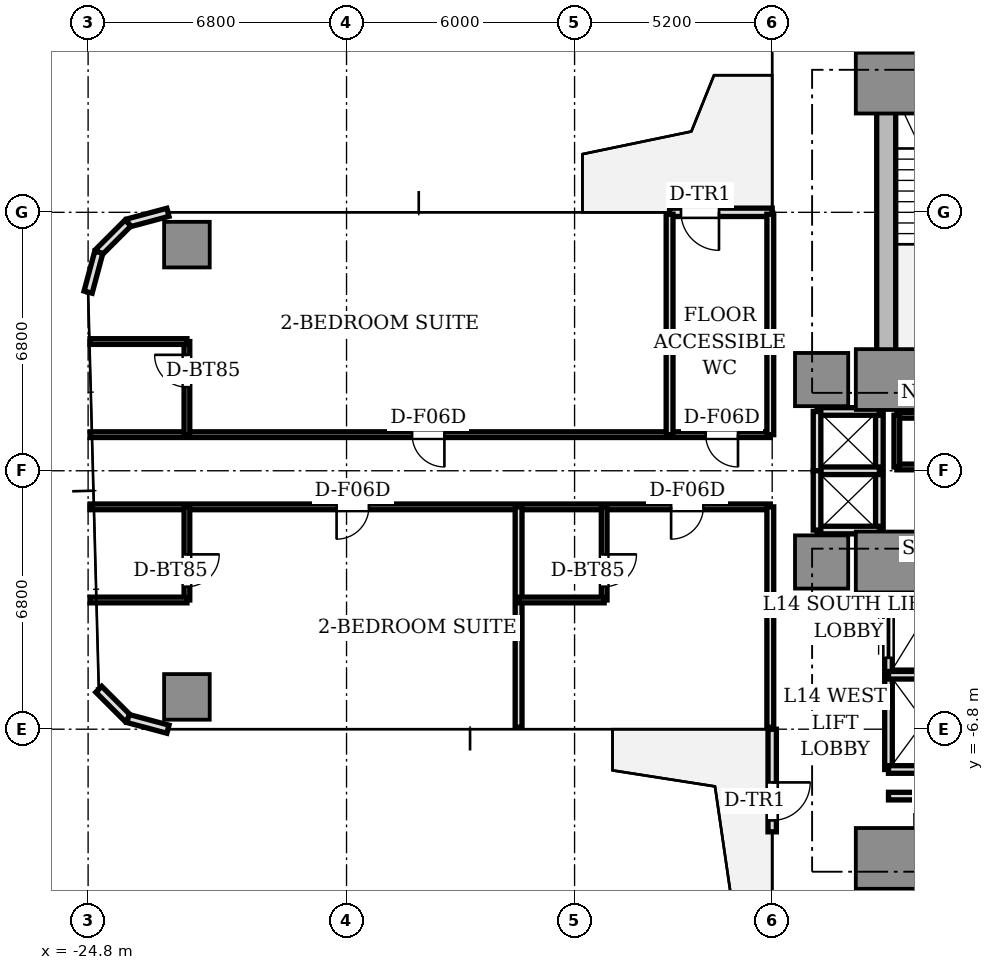
"""IFC4 building model, lengths in metres.
Left out: names, types, materials, properties, quantities, classifications, styles, units other than length and angle.
Written with IfcOpenShell. Run it as: python <this file> out.ifc"""

import sys

from ifc_helpers import new_model, si_unit, direction, frame, frame_2d, origin, origin_2d, place, context, subcontext, project, spatial, rectangle, extrude, source, transform, mapped, element, fill, save


model = new_model("IFC4")
c1 = context("Model", 3, precision=1e-05, world=origin(), true_north=direction((0.0, 1.0)))
c2 = subcontext(c1, "Body", "Model", "MODEL_VIEW")
j1 = project(units=[si_unit("LENGTHUNIT", "METRE"), si_unit("PLANEANGLEUNIT", "RADIAN")], contexts=[c1])
p1 = place(None, origin())
s1 = spatial("IfcSite", under=j1, at=p1, CompositionType="ELEMENT")
p2 = place(p1, origin())
s2 = spatial("IfcBuilding", under=s1, at=p2, CompositionType="ELEMENT")
p3 = place(p2, frame((0.0, 0.0, 54.4)))
s3 = spatial("IfcBuildingStorey", under=s2, at=p3, CompositionType="ELEMENT", Elevation=54.4)
p4 = place(p3, frame((-3.55, 10.2, 0.0), z_axis=(0.0, 0.0, 1.0), x_axis=(1.0, 0.0, 0.0)))
e1 = element("IfcWall", 1, at=p4, inside=s3, PredefinedType="SHEAR", context=c2, shape_type="SweptSolid", body=[
    extrude(rectangle(XDim=7.1, YDim=0.5, at=frame_2d((3.55, 0.0))), origin(), (0.0, 0.0, 1.0), 3.11),
])
p5 = place(p3, frame((-3.8, 2.85, 0.0), z_axis=(0.0, 0.0, 1.0), x_axis=(0.0, 1.0, 0.0)))
e2 = element("IfcWall", 2, at=p5, inside=s3, PredefinedType="SHEAR", context=c2, shape_type="SweptSolid", body=[
    extrude(rectangle(XDim=6.9, YDim=0.5, at=frame_2d((3.45, 0.0))), origin(), (0.0, 0.0, 1.0), 3.11),
])
p6 = place(p3, frame((-3.55, -10.2, 0.0), z_axis=(0.0, 0.0, 1.0), x_axis=(1.0, 0.0, 0.0)))
e3 = element("IfcWall", 3, at=p6, inside=s3, PredefinedType="SHEAR", context=c2, shape_type="SweptSolid", body=[
    extrude(rectangle(XDim=7.1, YDim=0.5, at=frame_2d((3.55, 0.0))), origin(), (0.0, 0.0, 1.0), 3.11),
])
m1 = source(origin(), c2, "Body", "SweptSolid", [
    extrude(rectangle(XDim=1.6, YDim=1.6, at=origin_2d()), origin(), (0.0, 0.0, 1.0), 3.11),
])
for number, where, z_axis, x_axis in (
    (4, (-3.8, 2.4, 0.0), (0.0, 0.0, 1.0), (1.0, 0.0, 0.0)),
    (5, (-3.8, 10.2, 0.0), (0.0, 0.0, 1.0), (1.0, 0.0, 0.0)),
    (6, (-3.8, -2.4, 0.0), (0.0, 0.0, 1.0), (1.0, 0.0, 0.0)),
    (7, (-3.8, -10.2, 0.0), (0.0, 0.0, 1.0), (1.0, 0.0, 0.0)),
):
    element("IfcColumn", number, at=place(p3, frame(where, z_axis=z_axis, x_axis=x_axis)), inside=s3, PredefinedType="COLUMN", context=c2, shape_type="MappedRepresentation", body=[
        mapped(m1, transform((0.0, 0.0, 0.0), scale=1.0)),
    ])
m2 = source(origin(), c2, "Body", "SweptSolid", [
    extrude(rectangle(XDim=1.4, YDim=1.4, at=origin_2d()), origin(), (0.0, 0.0, 1.0), 3.11),
])
for number, where, z_axis, x_axis in (
    (8, (-5.5, 2.4, 0.0), (0.0, 0.0, 1.0), (1.0, 0.0, 0.0)),
    (9, (-5.5, -2.4, 0.0), (0.0, 0.0, 1.0), (1.0, 0.0, 0.0)),
):
    element("IfcColumn", number, at=place(p3, frame(where, z_axis=z_axis, x_axis=x_axis)), inside=s3, PredefinedType="COLUMN", context=c2, shape_type="MappedRepresentation", body=[
        mapped(m2, transform((0.0, 0.0, 0.0), scale=1.0)),
    ])
m3 = source(origin(), c2, "Body", "SweptSolid", [
    extrude(rectangle(XDim=1.2, YDim=1.2, at=origin_2d()), origin(), (0.0, 0.0, 1.0), 3.11),
])
for number, where, z_axis, x_axis in (
    (10, (-22.2, 5.95, 0.0), (0.0, 0.0, 1.0), (1.0, 0.0, 0.0)),
    (11, (-22.2, -5.95, 0.0), (0.0, 0.0, 1.0), (1.0, 0.0, 0.0)),
):
    element("IfcColumn", number, at=place(p3, frame(where, z_axis=z_axis, x_axis=x_axis)), inside=s3, PredefinedType="COLUMN", context=c2, shape_type="MappedRepresentation", body=[
        mapped(m3, transform((0.0, 0.0, 0.0), scale=1.0)),
    ])
p7 = place(p3, frame((-6.8, 6.8, 0.0), z_axis=(0.0, 0.0, 1.0), x_axis=(-1.0, 0.0, 0.0)))
e12 = element("IfcWall", 12, at=p7, inside=s3, PredefinedType="STANDARD", context=c2, shape_type="SweptSolid", body=[
    extrude(rectangle(XDim=2.7, YDim=0.22, at=frame_2d((1.35, 0.0))), origin(), (0.0, 0.0, 1.0), 3.11),
])
p8 = place(p7, frame((1.4, 0.0, 0.0)))
e13 = element("IfcOpeningElement", 13, at=p8, cuts=e12, PredefinedType="OPENING", context=c2, shape_type="SweptSolid", body=[
    extrude(rectangle(XDim=1.0, YDim=2.2, at=frame_2d((0.5, 1.1))), frame((0.0, 0.12, 0.0), z_axis=(0.0, -1.0, 0.0), x_axis=(1.0, 0.0, 0.0)), (0.0, 0.0, 1.0), 0.24),
])
for number, where, z_axis, x_axis in (
    (14, (-22.7, 6.8, 0.0), (0.0, 0.0, 1.0), (-0.966, -0.259, 0.0)),
    (15, (-23.75, 6.519, 0.0), (0.0, 0.0, 1.0), (-0.707, -0.707, 0.0)),
    (16, (-24.519, 5.75, 0.0), (0.0, 0.0, 1.0), (-0.259, -0.966, 0.0)),
    (17, (-24.519, -5.75, 0.0), (0.0, 0.0, 1.0), (0.707, -0.707, 0.0)),
    (18, (-23.75, -6.519, 0.0), (0.0, 0.0, 1.0), (0.966, -0.259, 0.0)),
):
    element("IfcWall", number, at=place(p3, frame(where, z_axis=z_axis, x_axis=x_axis)), inside=s3, PredefinedType="STANDARD", context=c2, shape_type="SweptSolid", body=[
        extrude(rectangle(XDim=1.087, YDim=0.22, at=frame_2d((0.543, 0.0))), origin(), (0.0, 0.0, 1.0), 3.11),
    ])
p9 = place(p3, frame((-6.8, -6.8, 0.0), z_axis=(0.0, 0.0, 1.0), x_axis=(0.0, -1.0, 0.0)))
e19 = element("IfcWall", 19, at=p9, inside=s3, PredefinedType="STANDARD", context=c2, shape_type="SweptSolid", body=[
    extrude(rectangle(XDim=2.7, YDim=0.22, at=frame_2d((1.35, 0.0))), origin(), (0.0, 0.0, 1.0), 3.11),
])
p10 = place(p9, frame((1.4, 0.0, 0.0)))
e20 = element("IfcOpeningElement", 20, at=p10, cuts=e19, PredefinedType="OPENING", context=c2, shape_type="SweptSolid", body=[
    extrude(rectangle(XDim=1.0, YDim=2.2, at=frame_2d((0.5, 1.1))), frame((0.0, 0.12, 0.0), z_axis=(0.0, -1.0, 0.0), x_axis=(1.0, 0.0, 0.0)), (0.0, 0.0, 1.0), 0.24),
])
p11 = place(p3, frame((-3.72, 2.5, 0.0), z_axis=(0.0, 0.0, 1.0), x_axis=(1.0, 0.0, 0.0)))
e21 = element("IfcWall", 21, at=p11, inside=s3, PredefinedType="SOLIDWALL", context=c2, shape_type="SweptSolid", body=[
    extrude(rectangle(XDim=3.72, YDim=0.2, at=frame_2d((1.86, 0.0))), origin(), (0.0, 0.0, 1.0), 3.11),
])
p12 = place(p3, frame((-3.74, -5.36, 0.0), z_axis=(0.0, 0.0, 1.0), x_axis=(0.0, 1.0, 0.0)))
e22 = element("IfcWall", 22, at=p12, inside=s3, PredefinedType="SOLIDWALL", context=c2, shape_type="SweptSolid", body=[
    extrude(rectangle(XDim=2.08, YDim=0.2, at=frame_2d((1.04, 0.0))), origin(), (0.0, 0.0, 1.0), 2.66),
])
p13 = place(p12, frame((0.44, 0.0, 0.0)))
e23 = element("IfcOpeningElement", 23, at=p13, cuts=e22, PredefinedType="OPENING", context=c2, shape_type="SweptSolid", body=[
    extrude(rectangle(XDim=1.2, YDim=2.2, at=frame_2d((0.6, 1.1))), frame((0.0, 0.11, 0.0), z_axis=(0.0, -1.0, 0.0), x_axis=(1.0, 0.0, 0.0)), (0.0, 0.0, 1.0), 0.22),
])
p14 = place(p3, frame((-3.74, -7.86, 0.0), z_axis=(0.0, 0.0, 1.0), x_axis=(0.0, 1.0, 0.0)))
e24 = element("IfcWall", 24, at=p14, inside=s3, PredefinedType="SOLIDWALL", context=c2, shape_type="SweptSolid", body=[
    extrude(rectangle(XDim=2.48, YDim=0.2, at=frame_2d((1.24, 0.0))), origin(), (0.0, 0.0, 1.0), 2.66),
])
p15 = place(p3, frame((-3.74, -7.86, 0.0), z_axis=(0.0, 0.0, 1.0), x_axis=(1.0, 0.0, 0.0)))
e25 = element("IfcWall", 25, at=p15, inside=s3, PredefinedType="SOLIDWALL", context=c2, shape_type="SweptSolid", body=[
    extrude(rectangle(XDim=1.84, YDim=0.2, at=frame_2d((0.92, 0.0))), origin(), (0.0, 0.0, 1.0), 2.66),
])
p16 = place(p3, frame((-3.74, -5.38, 0.0), z_axis=(0.0, 0.0, 1.0), x_axis=(1.0, 0.0, 0.0)))
e26 = element("IfcWall", 26, at=p16, inside=s3, PredefinedType="SOLIDWALL", context=c2, shape_type="SweptSolid", body=[
    extrude(rectangle(XDim=3.69, YDim=0.2, at=frame_2d((1.845, 0.0))), origin(), (0.0, 0.0, 1.0), 2.66),
])
p17 = place(p3, frame((-3.98, -1.56, 0.0), z_axis=(0.0, 0.0, 1.0), x_axis=(0.0, 1.0, 0.0)))
e27 = element("IfcWall", 27, at=p17, inside=s3, PredefinedType="SOLIDWALL", context=c2, shape_type="SweptSolid", body=[
    extrude(rectangle(XDim=3.12, YDim=0.2, at=frame_2d((1.56, 0.0))), origin(), (0.0, 0.0, 1.0), 2.18),
])
for number, where, z_axis, x_axis in (
    (28, (-5.62, 1.56, 0.0), (0.0, 0.0, 1.0), (1.0, 0.0, 0.0)),
    (29, (-5.62, -1.56, 0.0), (0.0, 0.0, 1.0), (1.0, 0.0, 0.0)),
    (30, (-5.62, 0.0, 0.0), (0.0, 0.0, 1.0), (1.0, 0.0, 0.0)),
):
    element("IfcWall", number, at=place(p3, frame(where, z_axis=z_axis, x_axis=x_axis)), inside=s3, PredefinedType="SOLIDWALL", context=c2, shape_type="SweptSolid", body=[
        extrude(rectangle(XDim=1.64, YDim=0.2, at=frame_2d((0.82, 0.0))), origin(), (0.0, 0.0, 1.0), 2.66),
    ])
for number, where, z_axis, x_axis in (
    (31, (-5.62, 0.0, 0.0), (0.0, 0.0, 1.0), (0.0, 1.0, 0.0)),
    (32, (-5.62, -1.56, 0.0), (0.0, 0.0, 1.0), (0.0, 1.0, 0.0)),
):
    element("IfcWall", number, at=place(p3, frame(where, z_axis=z_axis, x_axis=x_axis)), inside=s3, PredefinedType="SOLIDWALL", context=c2, shape_type="SweptSolid", body=[
        extrude(rectangle(XDim=1.56, YDim=0.2, at=frame_2d((0.78, 0.0))), origin(), (0.0, 0.0, 1.0), 2.66),
    ])
p18 = place(p3, frame((-3.74, -8.56, 0.0), z_axis=(0.0, 0.0, 1.0), x_axis=(1.0, 0.0, 0.0)))
e33 = element("IfcWall", 33, at=p18, inside=s3, PredefinedType="SOLIDWALL", context=c2, shape_type="SweptSolid", body=[
    extrude(rectangle(XDim=3.62, YDim=0.2, at=frame_2d((1.81, 0.0))), origin(), (0.0, 0.0, 1.0), 2.66),
])
p19 = place(p18, frame((1.15, 0.0, 0.0)))
e34 = element("IfcOpeningElement", 34, at=p19, cuts=e33, PredefinedType="OPENING", context=c2, shape_type="SweptSolid", body=[
    extrude(rectangle(XDim=0.85, YDim=2.1, at=frame_2d((0.425, 1.05))), frame((0.0, 0.11, 0.0), z_axis=(0.0, -1.0, 0.0), x_axis=(1.0, 0.0, 0.0)), (0.0, 0.0, 1.0), 0.22),
])
p20 = place(p3, frame((-3.52, 0.1, 0.0), z_axis=(0.0, 0.0, 1.0), x_axis=(1.0, 0.0, 0.0)))
e35 = element("IfcWall", 35, at=p20, inside=s3, PredefinedType="PARTITIONING", context=c2, shape_type="SweptSolid", body=[
    extrude(rectangle(XDim=5.68, YDim=0.15, at=frame_2d((2.84, 0.0))), origin(), (0.0, 0.0, 1.0), 2.66),
])
p21 = place(p3, frame((-3.52, 1.46, 0.0), z_axis=(0.0, 0.0, 1.0), x_axis=(1.0, 0.0, 0.0)))
e36 = element("IfcWall", 36, at=p21, inside=s3, PredefinedType="PARTITIONING", context=c2, shape_type="SweptSolid", body=[
    extrude(rectangle(XDim=5.68, YDim=0.15, at=frame_2d((2.84, 0.0))), origin(), (0.0, 0.0, 1.0), 2.66),
])
p22 = place(p21, frame((1.15, 0.0, 0.0)))
e37 = element("IfcOpeningElement", 37, at=p22, cuts=e36, PredefinedType="OPENING", context=c2, shape_type="SweptSolid", body=[
    extrude(rectangle(XDim=0.85, YDim=2.1, at=frame_2d((0.425, 1.05))), frame((0.0, 0.085, 0.0), z_axis=(0.0, -1.0, 0.0), x_axis=(1.0, 0.0, 0.0)), (0.0, 0.0, 1.0), 0.17),
])
p23 = place(p21, frame((4.15, 0.0, 0.0)))
e38 = element("IfcOpeningElement", 38, at=p23, cuts=e36, PredefinedType="OPENING", context=c2, shape_type="SweptSolid", body=[
    extrude(rectangle(XDim=0.85, YDim=2.1, at=frame_2d((0.425, 1.05))), frame((0.0, 0.085, 0.0), z_axis=(0.0, -1.0, 0.0), x_axis=(1.0, 0.0, 0.0)), (0.0, 0.0, 1.0), 0.17),
])
p24 = place(p3, frame((-3.52, 0.1, 0.0), z_axis=(0.0, 0.0, 1.0), x_axis=(0.0, 1.0, 0.0)))
e39 = element("IfcWall", 39, at=p24, inside=s3, PredefinedType="PARTITIONING", context=c2, shape_type="SweptSolid", body=[
    extrude(rectangle(XDim=1.36, YDim=0.15, at=frame_2d((0.68, 0.0))), origin(), (0.0, 0.0, 1.0), 2.18),
])
p25 = place(p3, frame((-6.85, -0.95, 0.0), z_axis=(0.0, 0.0, 1.0), x_axis=(-1.0, 0.0, 0.0)))
e40 = element("IfcWall", 40, at=p25, inside=s3, PredefinedType="PARTITIONING", context=c2, shape_type="SweptSolid", body=[
    extrude(rectangle(XDim=17.9, YDim=0.15, at=frame_2d((8.95, 0.0))), origin(), (0.0, 0.0, 1.0), 2.66),
])
p26 = place(p25, frame((1.76, 0.0, 0.0)))
e41 = element("IfcOpeningElement", 41, at=p26, cuts=e40, PredefinedType="OPENING", context=c2, shape_type="SweptSolid", body=[
    extrude(rectangle(XDim=0.85, YDim=2.1, at=frame_2d((0.425, 1.05))), frame((0.0, 0.085, 0.0), z_axis=(0.0, -1.0, 0.0), x_axis=(1.0, 0.0, 0.0)), (0.0, 0.0, 1.0), 0.17),
])
p27 = place(p25, frame((10.562, 0.0, 0.0)))
e42 = element("IfcOpeningElement", 42, at=p27, cuts=e40, PredefinedType="OPENING", context=c2, shape_type="SweptSolid", body=[
    extrude(rectangle(XDim=0.85, YDim=2.1, at=frame_2d((0.425, 1.05))), frame((0.0, 0.085, 0.0), z_axis=(0.0, -1.0, 0.0), x_axis=(1.0, 0.0, 0.0)), (0.0, 0.0, 1.0), 0.17),
])
p28 = place(p3, frame((-6.85, 0.95, 0.0), z_axis=(0.0, 0.0, 1.0), x_axis=(-1.0, 0.0, 0.0)))
e43 = element("IfcWall", 43, at=p28, inside=s3, PredefinedType="PARTITIONING", context=c2, shape_type="SweptSolid", body=[
    extrude(rectangle(XDim=17.9, YDim=0.15, at=frame_2d((8.95, 0.0))), origin(), (0.0, 0.0, 1.0), 2.66),
])
p29 = place(p28, frame((0.85, 0.0, 0.0)))
e44 = element("IfcOpeningElement", 44, at=p29, cuts=e43, PredefinedType="OPENING", context=c2, shape_type="SweptSolid", body=[
    extrude(rectangle(XDim=0.85, YDim=2.1, at=frame_2d((0.425, 1.05))), frame((0.0, 0.085, 0.0), z_axis=(0.0, -1.0, 0.0), x_axis=(1.0, 0.0, 0.0)), (0.0, 0.0, 1.0), 0.17),
])
p30 = place(p28, frame((8.575, 0.0, 0.0)))
e45 = element("IfcOpeningElement", 45, at=p30, cuts=e43, PredefinedType="OPENING", context=c2, shape_type="SweptSolid", body=[
    extrude(rectangle(XDim=0.85, YDim=2.1, at=frame_2d((0.425, 1.05))), frame((0.0, 0.085, 0.0), z_axis=(0.0, -1.0, 0.0), x_axis=(1.0, 0.0, 0.0)), (0.0, 0.0, 1.0), 0.17),
])
for number, where, z_axis, x_axis in (
    (46, (-6.85, -0.95, 0.0), (0.0, 0.0, 1.0), (0.0, -1.0, 0.0)),
    (47, (-6.85, 6.75, 0.0), (0.0, 0.0, 1.0), (0.0, -1.0, 0.0)),
    (48, (-13.473, -0.95, 0.0), (0.0, 0.0, 1.0), (0.0, -1.0, 0.0)),
):
    element("IfcWall", number, at=place(p3, frame(where, z_axis=z_axis, x_axis=x_axis)), inside=s3, PredefinedType="PARTITIONING", context=c2, shape_type="SweptSolid", body=[
        extrude(rectangle(XDim=5.8, YDim=0.18, at=frame_2d((2.9, 0.0))), origin(), (0.0, 0.0, 1.0), 2.66),
    ])
p31 = place(p3, frame((-11.221, -0.95, 0.0), z_axis=(0.0, 0.0, 1.0), x_axis=(0.0, -1.0, 0.0)))
e49 = element("IfcWall", 49, at=p31, inside=s3, PredefinedType="PARTITIONING", context=c2, shape_type="SweptSolid", body=[
    extrude(rectangle(XDim=2.45, YDim=0.15, at=frame_2d((1.225, 0.0))), origin(), (0.0, 0.0, 1.0), 2.66),
])
p32 = place(p31, frame((1.25, 0.0, 0.0)))
e50 = element("IfcOpeningElement", 50, at=p32, cuts=e49, PredefinedType="OPENING", context=c2, shape_type="SweptSolid", body=[
    extrude(rectangle(XDim=0.85, YDim=2.1, at=frame_2d((0.425, 1.05))), frame((0.0, 0.085, 0.0), z_axis=(0.0, -1.0, 0.0), x_axis=(1.0, 0.0, 0.0)), (0.0, 0.0, 1.0), 0.17),
])
p33 = place(p3, frame((-11.221, -3.4, 0.0), z_axis=(0.0, 0.0, 1.0), x_axis=(-1.0, 0.0, 0.0)))
e51 = element("IfcWall", 51, at=p33, inside=s3, PredefinedType="PARTITIONING", context=c2, shape_type="SweptSolid", body=[
    extrude(rectangle(XDim=2.252, YDim=0.15, at=frame_2d((1.126, 0.0))), origin(), (0.0, 0.0, 1.0), 2.63),
])
p34 = place(p3, frame((-22.2, -0.95, 0.0), z_axis=(0.0, 0.0, 1.0), x_axis=(0.0, -1.0, 0.0)))
e52 = element("IfcWall", 52, at=p34, inside=s3, PredefinedType="PARTITIONING", context=c2, shape_type="SweptSolid", body=[
    extrude(rectangle(XDim=2.45, YDim=0.15, at=frame_2d((1.225, 0.0))), origin(), (0.0, 0.0, 1.0), 2.58),
])
p35 = place(p34, frame((1.25, 0.0, 0.0)))
e53 = element("IfcOpeningElement", 53, at=p35, cuts=e52, PredefinedType="OPENING", context=c2, shape_type="SweptSolid", body=[
    extrude(rectangle(XDim=0.85, YDim=2.1, at=frame_2d((0.425, 1.05))), frame((0.0, 0.085, 0.0), z_axis=(0.0, -1.0, 0.0), x_axis=(1.0, 0.0, 0.0)), (0.0, 0.0, 1.0), 0.17),
])
p36 = place(p3, frame((-22.2, -3.4, 0.0), z_axis=(0.0, 0.0, 1.0), x_axis=(-1.0, 0.0, 0.0)))
e54 = element("IfcWall", 54, at=p36, inside=s3, PredefinedType="PARTITIONING", context=c2, shape_type="SweptSolid", body=[
    extrude(rectangle(XDim=2.55, YDim=0.15, at=frame_2d((1.275, 0.0))), origin(), (0.0, 0.0, 1.0), 2.66),
])
p37 = place(p3, frame((-9.5, 0.95, 0.0), z_axis=(0.0, 0.0, 1.0), x_axis=(0.0, 1.0, 0.0)))
e55 = element("IfcWall", 55, at=p37, inside=s3, PredefinedType="PARTITIONING", context=c2, shape_type="SweptSolid", body=[
    extrude(rectangle(XDim=5.8, YDim=0.18, at=frame_2d((2.9, 0.0))), origin(), (0.0, 0.0, 1.0), 2.66),
])
p38 = place(p3, frame((-22.2, 0.95, 0.0), z_axis=(0.0, 0.0, 1.0), x_axis=(0.0, 1.0, 0.0)))
e56 = element("IfcWall", 56, at=p38, inside=s3, PredefinedType="PARTITIONING", context=c2, shape_type="SweptSolid", body=[
    extrude(rectangle(XDim=2.45, YDim=0.15, at=frame_2d((1.225, 0.0))), origin(), (0.0, 0.0, 1.0), 2.58),
])
p39 = place(p38, frame((1.25, 0.0, 0.0)))
e57 = element("IfcOpeningElement", 57, at=p39, cuts=e56, PredefinedType="OPENING", context=c2, shape_type="SweptSolid", body=[
    extrude(rectangle(XDim=0.85, YDim=2.1, at=frame_2d((0.425, 1.05))), frame((0.0, 0.085, 0.0), z_axis=(0.0, -1.0, 0.0), x_axis=(1.0, 0.0, 0.0)), (0.0, 0.0, 1.0), 0.17),
])
p40 = place(p3, frame((-22.2, 3.4, 0.0), z_axis=(0.0, 0.0, 1.0), x_axis=(-1.0, 0.0, 0.0)))
e58 = element("IfcWall", 58, at=p40, inside=s3, PredefinedType="PARTITIONING", context=c2, shape_type="SweptSolid", body=[
    extrude(rectangle(XDim=2.55, YDim=0.15, at=frame_2d((1.275, 0.0))), origin(), (0.0, 0.0, 1.0), 2.66),
])
m4 = source(origin(), c2, "Body", "SweptSolid", [
    extrude(rectangle(XDim=1.0, YDim=0.05, at=origin_2d()), origin(), (0.0, 0.0, 1.0), 2.2),
])
p41 = place(p8, frame((0.5, 0.0, 0.0)))
e59 = element("IfcDoor", 59, at=p41, inside=s3, OperationType="SINGLE_SWING_LEFT", PredefinedType="DOOR", context=c2, shape_type="MappedRepresentation", body=[
    mapped(m4, transform((0.0, 0.0, 0.0), scale=1.0)),
])
fill(e13, e59)
p42 = place(p10, frame((0.5, 0.0, 0.0)))
e60 = element("IfcDoor", 60, at=p42, inside=s3, OperationType="SINGLE_SWING_LEFT", PredefinedType="DOOR", context=c2, shape_type="MappedRepresentation", body=[
    mapped(m4, transform((0.0, 0.0, 0.0), scale=1.0)),
])
fill(e20, e60)
m5 = source(origin(), c2, "Body", "SweptSolid", [
    extrude(rectangle(XDim=1.2, YDim=0.05, at=origin_2d()), origin(), (0.0, 0.0, 1.0), 2.2),
])
p43 = place(p13, frame((0.6, 0.0, 0.0)))
e61 = element("IfcDoor", 61, at=p43, inside=s3, OperationType="DOUBLE_DOOR_SLIDING", PredefinedType="DOOR", context=c2, shape_type="MappedRepresentation", body=[
    mapped(m5, transform((0.0, 0.0, 0.0), scale=1.0)),
])
fill(e23, e61)
m6 = source(origin(), c2, "Body", "SweptSolid", [
    extrude(rectangle(XDim=0.85, YDim=0.05, at=origin_2d()), origin(), (0.0, 0.0, 1.0), 2.1),
])
p44 = place(p32, frame((0.425, 0.0, 0.0)))
e62 = element("IfcDoor", 62, at=p44, inside=s3, OperationType="SINGLE_SWING_LEFT", PredefinedType="DOOR", context=c2, shape_type="MappedRepresentation", body=[
    mapped(m6, transform((0.0, 0.0, 0.0), scale=1.0)),
])
fill(e50, e62)
p45 = place(p26, frame((0.425, 0.0, 0.0)))
e63 = element("IfcDoor", 63, at=p45, inside=s3, OperationType="SINGLE_SWING_RIGHT", PredefinedType="DOOR", context=c2, shape_type="MappedRepresentation", body=[
    mapped(m6, transform((0.0, 0.0, 0.0), scale=1.0)),
])
fill(e41, e63)
p46 = place(p35, frame((0.425, 0.0, 0.0)))
e64 = element("IfcDoor", 64, at=p46, inside=s3, OperationType="SINGLE_SWING_LEFT", PredefinedType="DOOR", context=c2, shape_type="MappedRepresentation", body=[
    mapped(m6, transform((0.0, 0.0, 0.0), scale=1.0)),
])
fill(e53, e64)
p47 = place(p27, frame((0.425, 0.0, 0.0)))
e65 = element("IfcDoor", 65, at=p47, inside=s3, OperationType="SINGLE_SWING_RIGHT", PredefinedType="DOOR", context=c2, shape_type="MappedRepresentation", body=[
    mapped(m6, transform((0.0, 0.0, 0.0), scale=1.0)),
])
fill(e42, e65)
p48 = place(p29, frame((0.425, 0.0, 0.0)))
e66 = element("IfcDoor", 66, at=p48, inside=s3, OperationType="SINGLE_SWING_LEFT", PredefinedType="DOOR", context=c2, shape_type="MappedRepresentation", body=[
    mapped(m6, transform((0.0, 0.0, 0.0), scale=1.0)),
])
fill(e44, e66)
p49 = place(p39, frame((0.425, 0.0, 0.0)))
e67 = element("IfcDoor", 67, at=p49, inside=s3, OperationType="SINGLE_SWING_RIGHT", PredefinedType="DOOR", context=c2, shape_type="MappedRepresentation", body=[
    mapped(m6, transform((0.0, 0.0, 0.0), scale=1.0)),
])
fill(e57, e67)
p50 = place(p30, frame((0.425, 0.0, 0.0)))
e68 = element("IfcDoor", 68, at=p50, inside=s3, OperationType="SINGLE_SWING_LEFT", PredefinedType="DOOR", context=c2, shape_type="MappedRepresentation", body=[
    mapped(m6, transform((0.0, 0.0, 0.0), scale=1.0)),
])
fill(e45, e68)
save(model, sys.argv[1])
